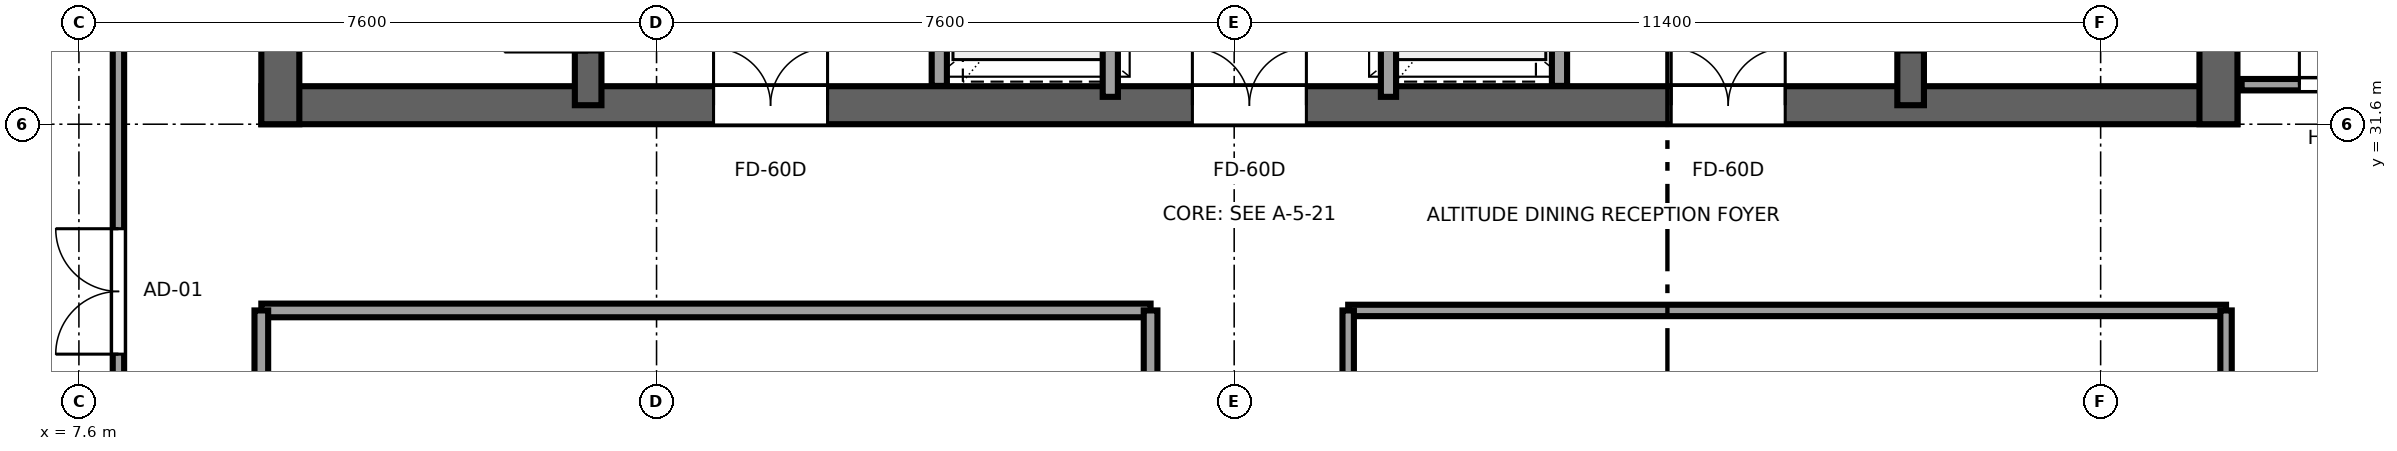
"""IFC4 building model, lengths in metres.
Left out: names, types, materials, properties, quantities, classifications, styles, units other than length and angle.
Written with IfcOpenShell. Run it as: python <this file> out.ifc"""

import sys

from ifc_helpers import new_model, si_unit, direction, frame, frame_2d, origin, place, context, subcontext, project, spatial, rectangle, extrude, source, transform, mapped, element, fill, save


model = new_model("IFC4")
c1 = context("Model", 3, precision=1e-05, world=origin(), true_north=direction((0.0, 1.0)))
c2 = subcontext(c1, "Body", "Model", "MODEL_VIEW")
j1 = project(units=[si_unit("LENGTHUNIT", "METRE"), si_unit("PLANEANGLEUNIT", "RADIAN")], contexts=[c1])
p1 = place(None, origin())
s1 = spatial("IfcSite", under=j1, at=p1, CompositionType="ELEMENT")
p2 = place(p1, origin())
s2 = spatial("IfcBuilding", under=s1, at=p2, CompositionType="ELEMENT")
p3 = place(p2, frame((0.0, 0.0, 286.55)))
s3 = spatial("IfcBuildingStorey", under=s2, at=p3, CompositionType="ELEMENT", Elevation=286.55)
p4 = place(p3, frame((10.0, 31.85, 0.0), z_axis=(0.0, 0.0, 1.0), x_axis=(1.0, 0.0, 0.0)))
e1 = element("IfcWall", 1, at=p4, inside=s3, PredefinedType="SHEAR", context=c2, shape_type="SweptSolid", body=[
    extrude(rectangle(XDim=26.0, YDim=0.5, at=frame_2d((13.0, 0.0))), origin(), (0.0, 0.0, 1.0), 4.4),
])
p5 = place(p4, frame((7.45, 0.0, 0.0), z_axis=(0.0, 0.0, 1.0), x_axis=(-1.0, 0.0, 0.0)))
e2 = element("IfcOpeningElement", 2, at=p5, cuts=e1, PredefinedType="OPENING", context=c2, shape_type="SweptSolid", body=[
    extrude(rectangle(XDim=1.5, YDim=2.04, at=frame_2d((0.75, 1.02))), frame((0.0, 0.26, 0.0), z_axis=(0.0, -1.0, 0.0), x_axis=(1.0, 0.0, 0.0)), (0.0, 0.0, 1.0), 0.52),
])
p6 = place(p4, frame((13.75, 0.0, 0.0), z_axis=(0.0, 0.0, 1.0), x_axis=(-1.0, 0.0, 0.0)))
e3 = element("IfcOpeningElement", 3, at=p6, cuts=e1, PredefinedType="OPENING", context=c2, shape_type="SweptSolid", body=[
    extrude(rectangle(XDim=1.5, YDim=2.04, at=frame_2d((0.75, 1.02))), frame((0.0, 0.26, 0.0), z_axis=(0.0, -1.0, 0.0), x_axis=(1.0, 0.0, 0.0)), (0.0, 0.0, 1.0), 0.52),
])
p7 = place(p4, frame((20.05, 0.0, 0.0), z_axis=(0.0, 0.0, 1.0), x_axis=(-1.0, 0.0, 0.0)))
e4 = element("IfcOpeningElement", 4, at=p7, cuts=e1, PredefinedType="OPENING", context=c2, shape_type="SweptSolid", body=[
    extrude(rectangle(XDim=1.5, YDim=2.04, at=frame_2d((0.75, 1.02))), frame((0.0, 0.26, 0.0), z_axis=(0.0, -1.0, 0.0), x_axis=(1.0, 0.0, 0.0)), (0.0, 0.0, 1.0), 0.52),
])
for number, where, z_axis, x_axis in (
    (5, (10.25, 31.6, 0.0), (0.0, 0.0, 1.0), (0.0, 1.0, 0.0)),
    (6, (35.75, 31.6, 0.0), (0.0, 0.0, 1.0), (0.0, 1.0, 0.0)),
):
    element("IfcWall", number, at=place(p3, frame(where, z_axis=z_axis, x_axis=x_axis)), inside=s3, PredefinedType="SHEAR", context=c2, shape_type="SweptSolid", body=[
        extrude(rectangle(XDim=13.6, YDim=0.5, at=frame_2d((6.8, 0.0))), origin(), (0.0, 0.0, 1.0), 4.4),
    ])
p8 = place(p3, frame((14.3, 31.85, 0.0), z_axis=(0.0, 0.0, 1.0), x_axis=(0.0, 1.0, 0.0)))
e7 = element("IfcWall", 7, at=p8, inside=s3, PredefinedType="SHEAR", context=c2, shape_type="SweptSolid", body=[
    extrude(rectangle(XDim=13.1, YDim=0.35, at=frame_2d((6.55, 0.0))), origin(), (0.0, 0.0, 1.0), 4.4),
])
p9 = place(p8, frame((0.7, 0.0, 0.0)))
e8 = element("IfcOpeningElement", 8, at=p9, cuts=e7, PredefinedType="OPENING", context=c2, shape_type="SweptSolid", body=[
    extrude(rectangle(XDim=1.1, YDim=2.12, at=frame_2d((0.55, 1.06))), frame((0.0, 0.185, 0.0), z_axis=(0.0, -1.0, 0.0), x_axis=(1.0, 0.0, 0.0)), (0.0, 0.0, 1.0), 0.37),
])
p10 = place(p3, frame((31.7, 31.85, 0.0), z_axis=(0.0, 0.0, 1.0), x_axis=(0.0, 1.0, 0.0)))
e9 = element("IfcWall", 9, at=p10, inside=s3, PredefinedType="SHEAR", context=c2, shape_type="SweptSolid", body=[
    extrude(rectangle(XDim=13.1, YDim=0.35, at=frame_2d((6.55, 0.0))), origin(), (0.0, 0.0, 1.0), 4.4),
])
p11 = place(p10, frame((1.8, 0.0, 0.0), z_axis=(0.0, 0.0, 1.0), x_axis=(-1.0, 0.0, 0.0)))
e10 = element("IfcOpeningElement", 10, at=p11, cuts=e9, PredefinedType="OPENING", context=c2, shape_type="SweptSolid", body=[
    extrude(rectangle(XDim=1.1, YDim=2.12, at=frame_2d((0.55, 1.06))), frame((0.0, 0.185, 0.0), z_axis=(0.0, -1.0, 0.0), x_axis=(1.0, 0.0, 0.0)), (0.0, 0.0, 1.0), 0.37),
])
for number, where, z_axis, x_axis in (
    (11, (18.92, 32.104, 0.0), (0.0, 0.0, 1.0), (0.0, 1.0, 0.0)),
    (12, (27.08, 32.104, 0.0), (0.0, 0.0, 1.0), (0.0, 1.0, 0.0)),
):
    element("IfcWall", number, at=place(p3, frame(where, z_axis=z_axis, x_axis=x_axis)), inside=s3, PredefinedType="SOLIDWALL", context=c2, shape_type="SweptSolid", body=[
        extrude(rectangle(XDim=4.046, YDim=0.2, at=frame_2d((2.023, 0.0))), origin(), (0.0, 0.0, 1.0), 4.14),
    ])
p12 = place(p3, frame((21.17, 31.96, 0.0), z_axis=(0.0, 0.0, 1.0), x_axis=(0.0, 1.0, 0.0)))
e13 = element("IfcWall", 13, at=p12, inside=s3, PredefinedType="SOLIDWALL", context=c2, shape_type="SweptSolid", body=[
    extrude(rectangle(XDim=5.08, YDim=0.2, at=frame_2d((2.54, 0.0))), origin(), (0.0, 0.0, 1.0), 4.14),
])
p13 = place(p12, frame((0.74, 0.0, 0.0)))
e14 = element("IfcOpeningElement", 14, at=p13, cuts=e13, PredefinedType="OPENING", context=c2, shape_type="SweptSolid", body=[
    extrude(rectangle(XDim=1.1, YDim=2.12, at=frame_2d((0.55, 1.06))), frame((0.0, 0.11, 0.0), z_axis=(0.0, -1.0, 0.0), x_axis=(1.0, 0.0, 0.0)), (0.0, 0.0, 1.0), 0.22),
])
p14 = place(p12, frame((3.24, 0.0, 0.0)))
e15 = element("IfcOpeningElement", 15, at=p14, cuts=e13, PredefinedType="OPENING", context=c2, shape_type="SweptSolid", body=[
    extrude(rectangle(XDim=1.1, YDim=2.12, at=frame_2d((0.55, 1.06))), frame((0.0, 0.11, 0.0), z_axis=(0.0, -1.0, 0.0), x_axis=(1.0, 0.0, 0.0)), (0.0, 0.0, 1.0), 0.22),
])
p15 = place(p3, frame((24.83, 31.96, 0.0), z_axis=(0.0, 0.0, 1.0), x_axis=(0.0, 1.0, 0.0)))
e16 = element("IfcWall", 16, at=p15, inside=s3, PredefinedType="SOLIDWALL", context=c2, shape_type="SweptSolid", body=[
    extrude(rectangle(XDim=5.08, YDim=0.2, at=frame_2d((2.54, 0.0))), origin(), (0.0, 0.0, 1.0), 4.14),
])
p16 = place(p15, frame((0.74, 0.0, 0.0)))
e17 = element("IfcOpeningElement", 17, at=p16, cuts=e16, PredefinedType="OPENING", context=c2, shape_type="SweptSolid", body=[
    extrude(rectangle(XDim=1.1, YDim=2.12, at=frame_2d((0.55, 1.06))), frame((0.0, 0.11, 0.0), z_axis=(0.0, -1.0, 0.0), x_axis=(1.0, 0.0, 0.0)), (0.0, 0.0, 1.0), 0.22),
])
p17 = place(p15, frame((3.24, 0.0, 0.0)))
e18 = element("IfcOpeningElement", 18, at=p17, cuts=e16, PredefinedType="OPENING", context=c2, shape_type="SweptSolid", body=[
    extrude(rectangle(XDim=1.1, YDim=2.12, at=frame_2d((0.55, 1.06))), frame((0.0, 0.11, 0.0), z_axis=(0.0, -1.0, 0.0), x_axis=(1.0, 0.0, 0.0)), (0.0, 0.0, 1.0), 0.22),
])
p18 = place(p3, frame((10.0, 29.15, 0.0), z_axis=(0.0, 0.0, 1.0), x_axis=(1.0, 0.0, 0.0)))
e19 = element("IfcWall", 19, at=p18, inside=s3, PredefinedType="PARTITIONING", context=c2, shape_type="SweptSolid", body=[
    extrude(rectangle(XDim=11.7, YDim=0.18, at=frame_2d((5.85, 0.0))), origin(), (0.0, 0.0, 1.0), 4.14),
])
for number, where, z_axis, x_axis in (
    (20, (10.0, 26.45, 0.0), (0.0, 0.0, 1.0), (0.0, 1.0, 0.0)),
    (21, (21.7, 26.45, 0.0), (0.0, 0.0, 1.0), (0.0, 1.0, 0.0)),
):
    element("IfcWall", number, at=place(p3, frame(where, z_axis=z_axis, x_axis=x_axis)), inside=s3, PredefinedType="PARTITIONING", context=c2, shape_type="SweptSolid", body=[
        extrude(rectangle(XDim=2.7, YDim=0.18, at=frame_2d((1.35, 0.0))), origin(), (0.0, 0.0, 1.0), 4.14),
    ])
p19 = place(p3, frame((24.3, 29.15, 0.0), z_axis=(0.0, 0.0, 1.0), x_axis=(1.0, 0.0, 0.0)))
e22 = element("IfcWall", 22, at=p19, inside=s3, PredefinedType="PARTITIONING", context=c2, shape_type="SweptSolid", body=[
    extrude(rectangle(XDim=11.55, YDim=0.15, at=frame_2d((5.775, 0.0))), origin(), (0.0, 0.0, 1.0), 4.14),
])
for number, where, z_axis, x_axis in (
    (23, (24.3, 26.45, 0.0), (0.0, 0.0, 1.0), (0.0, 1.0, 0.0)),
    (24, (35.85, 26.45, 0.0), (0.0, 0.0, 1.0), (0.0, 1.0, 0.0)),
):
    element("IfcWall", number, at=place(p3, frame(where, z_axis=z_axis, x_axis=x_axis)), inside=s3, PredefinedType="PARTITIONING", context=c2, shape_type="SweptSolid", body=[
        extrude(rectangle(XDim=2.7, YDim=0.15, at=frame_2d((1.35, 0.0))), origin(), (0.0, 0.0, 1.0), 4.14),
    ])
p20 = place(p3, frame((8.12, 24.4, 0.0), z_axis=(0.0, 0.0, 1.0), x_axis=(0.0, 1.0, 0.0)))
e25 = element("IfcWall", 25, at=p20, inside=s3, PredefinedType="PARTITIONING", context=c2, shape_type="SweptSolid", body=[
    extrude(rectangle(XDim=10.0, YDim=0.15, at=frame_2d((5.0, 0.0))), origin(), (0.0, 0.0, 1.0), 4.14),
])
p21 = place(p20, frame((4.175, 0.0, 0.0)))
e26 = element("IfcOpeningElement", 26, at=p21, cuts=e25, PredefinedType="OPENING", context=c2, shape_type="SweptSolid", body=[
    extrude(rectangle(XDim=1.65, YDim=2.15, at=frame_2d((0.825, 1.075))), frame((0.0, 0.085, 0.0), z_axis=(0.0, -1.0, 0.0), x_axis=(1.0, 0.0, 0.0)), (0.0, 0.0, 1.0), 0.17),
])
p22 = place(p3, frame((36.055, 32.12, 0.0), z_axis=(0.0, 0.0, 1.0), x_axis=(1.0, 0.0, 0.0)))
e27 = element("IfcWall", 27, at=p22, inside=s3, PredefinedType="PARTITIONING", context=c2, shape_type="SweptSolid", body=[
    extrude(rectangle(XDim=2.54, YDim=0.15, at=frame_2d((1.27, 0.0))), origin(), (0.0, 0.0, 1.0), 4.14),
])
p23 = place(p22, frame((0.76, 0.0, 0.0)))
e28 = element("IfcOpeningElement", 28, at=p23, cuts=e27, PredefinedType="OPENING", context=c2, shape_type="SweptSolid", body=[
    extrude(rectangle(XDim=1.02, YDim=2.03, at=frame_2d((0.51, 1.015))), frame((0.0, 0.085, 0.0), z_axis=(0.0, -1.0, 0.0), x_axis=(1.0, 0.0, 0.0)), (0.0, 0.0, 1.0), 0.17),
])
m1 = source(origin(), c2, "Body", "SweptSolid", [
    extrude(rectangle(XDim=1.5, YDim=2.04, at=frame_2d((0.75, 1.02))), frame((0.0, 0.025, 0.0), z_axis=(0.0, -1.0, 0.0), x_axis=(1.0, 0.0, 0.0)), (0.0, 0.0, 1.0), 0.05),
])
p24 = place(p5, origin())
e29 = element("IfcDoor", 29, at=p24, inside=s3, OperationType="DOUBLE_DOOR_SINGLE_SWING", PredefinedType="DOOR", context=c2, shape_type="MappedRepresentation", body=[
    mapped(m1, transform((0.0, 0.0, 0.0), x_axis=(1.0, 0.0, 0.0), y_axis=(0.0, 1.0, 0.0), z_axis=(0.0, 0.0, 1.0), scale=1.0)),
])
fill(e2, e29)
p25 = place(p6, origin())
e30 = element("IfcDoor", 30, at=p25, inside=s3, OperationType="DOUBLE_DOOR_SINGLE_SWING", PredefinedType="DOOR", context=c2, shape_type="MappedRepresentation", body=[
    mapped(m1, transform((0.0, 0.0, 0.0), x_axis=(1.0, 0.0, 0.0), y_axis=(0.0, 1.0, 0.0), z_axis=(0.0, 0.0, 1.0), scale=1.0)),
])
fill(e3, e30)
p26 = place(p7, origin())
e31 = element("IfcDoor", 31, at=p26, inside=s3, OperationType="DOUBLE_DOOR_SINGLE_SWING", PredefinedType="DOOR", context=c2, shape_type="MappedRepresentation", body=[
    mapped(m1, transform((0.0, 0.0, 0.0), x_axis=(1.0, 0.0, 0.0), y_axis=(0.0, 1.0, 0.0), z_axis=(0.0, 0.0, 1.0), scale=1.0)),
])
fill(e4, e31)
m2 = source(origin(), c2, "Body", "SweptSolid", [
    extrude(rectangle(XDim=1.65, YDim=2.15, at=frame_2d((0.825, 1.075))), frame((0.0, 0.025, 0.0), z_axis=(0.0, -1.0, 0.0), x_axis=(1.0, 0.0, 0.0)), (0.0, 0.0, 1.0), 0.05),
])
p27 = place(p21, origin())
e32 = element("IfcDoor", 32, at=p27, inside=s3, OperationType="DOUBLE_DOOR_SINGLE_SWING", PredefinedType="DOOR", context=c2, shape_type="MappedRepresentation", body=[
    mapped(m2, transform((0.0, 0.0, 0.0), x_axis=(1.0, 0.0, 0.0), y_axis=(0.0, 1.0, 0.0), z_axis=(0.0, 0.0, 1.0), scale=1.0)),
])
fill(e26, e32)
m3 = source(origin(), c2, "Body", "SweptSolid", [
    extrude(rectangle(XDim=1.02, YDim=2.03, at=frame_2d((0.51, 1.015))), frame((0.0, 0.025, 0.0), z_axis=(0.0, -1.0, 0.0), x_axis=(1.0, 0.0, 0.0)), (0.0, 0.0, 1.0), 0.05),
])
p28 = place(p23, origin())
e33 = element("IfcDoor", 33, at=p28, inside=s3, OperationType="SINGLE_SWING_LEFT", PredefinedType="DOOR", context=c2, shape_type="MappedRepresentation", body=[
    mapped(m3, transform((0.0, 0.0, 0.0), x_axis=(1.0, 0.0, 0.0), y_axis=(0.0, 1.0, 0.0), z_axis=(0.0, 0.0, 1.0), scale=1.0)),
])
fill(e28, e33)
save(model, sys.argv[1])
